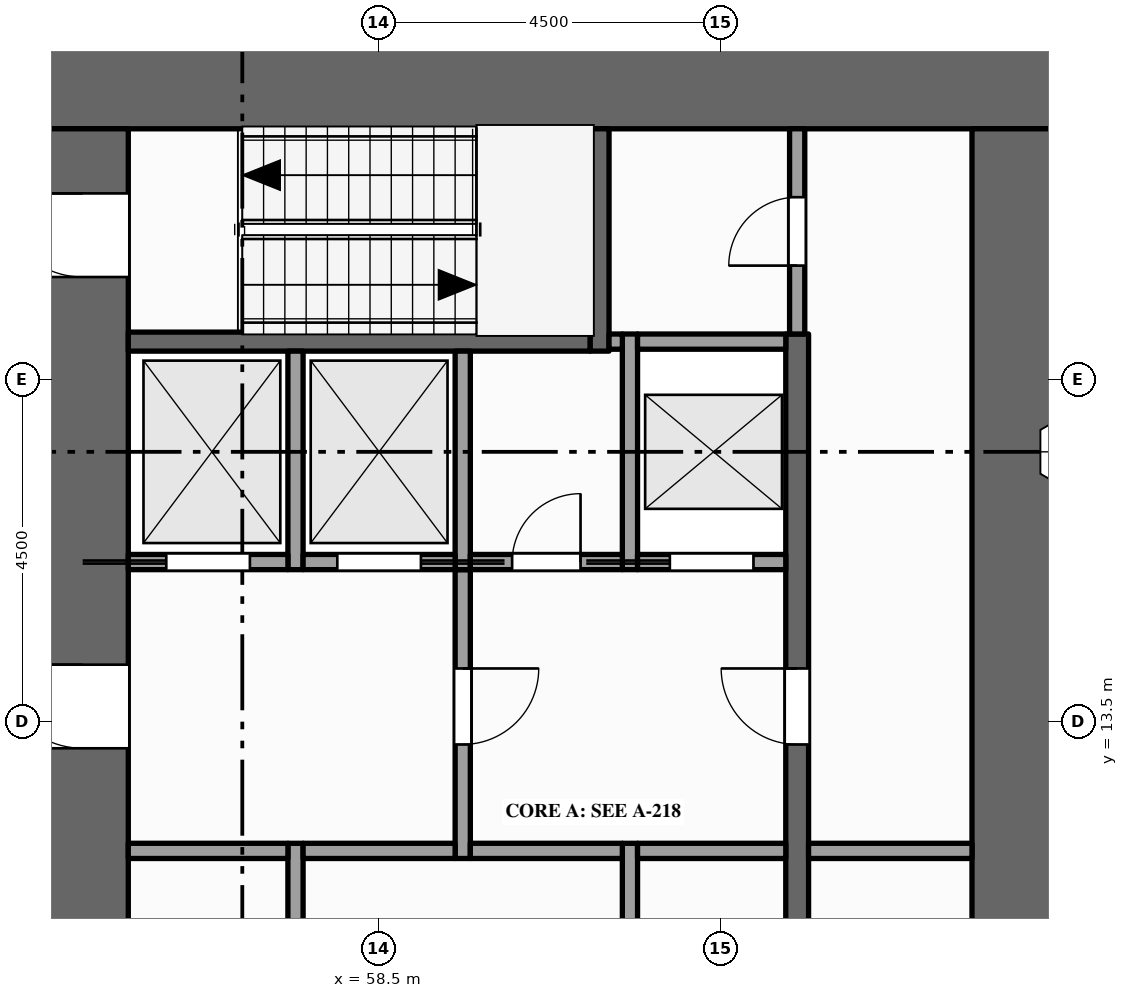
"""IFC4 building model, lengths in metres.
Left out: names, types, materials, properties, quantities, classifications, styles, units other than length and angle.
Written with IfcOpenShell. Run it as: python <this file> out.ifc"""

import sys

from ifc_helpers import new_model, si_unit, direction, frame, frame_2d, origin, place, context, subcontext, project, spatial, rectangle, extrude, element, fill, save


model = new_model("IFC4")
c1 = context("Model", 3, precision=1e-05, world=origin(), true_north=direction((0.0, 1.0)))
c2 = subcontext(c1, "Body", "Model", "MODEL_VIEW")
j1 = project(units=[si_unit("LENGTHUNIT", "METRE"), si_unit("PLANEANGLEUNIT", "RADIAN")], contexts=[c1])
p1 = place(None, origin())
s1 = spatial("IfcSite", under=j1, at=p1, CompositionType="ELEMENT")
p2 = place(p1, origin())
s2 = spatial("IfcBuilding", under=s1, at=p2, CompositionType="ELEMENT")
p3 = place(p2, frame((0.0, 0.0, 103.0)))
s3 = spatial("IfcBuildingStorey", under=s2, at=p3, CompositionType="ELEMENT", Elevation=103.0)
p4 = place(p3, frame((54.0, 21.9, -0.15), z_axis=(0.0, 0.0, 1.0), x_axis=(1.0, 0.0, 0.0)))
e1 = element("IfcWall", 1, at=p4, inside=s3, PredefinedType="SHEAR", context=c2, shape_type="SweptSolid", body=[
    extrude(rectangle(XDim=13.5, YDim=1.2, at=frame_2d((6.75, 0.0))), origin(), (0.0, 0.0, 1.0), 4.0),
])
p5 = place(p3, frame((54.6, 1.2, -0.15), z_axis=(0.0, 0.0, 1.0), x_axis=(0.0, 1.0, 0.0)))
e2 = element("IfcWall", 2, at=p5, inside=s3, PredefinedType="SHEAR", context=c2, shape_type="SweptSolid", body=[
    extrude(rectangle(XDim=20.1, YDim=1.2, at=frame_2d((10.05, 0.0))), origin(), (0.0, 0.0, 1.0), 4.0),
])
p6 = place(p5, frame((5.9, 0.0, 0.15)))
e3 = element("IfcOpeningElement", 3, at=p6, cuts=e2, PredefinedType="OPENING", context=c2, shape_type="SweptSolid", body=[
    extrude(rectangle(XDim=1.8, YDim=2.1, at=frame_2d((0.9, 1.05))), frame((0.0, 0.61, 0.0), z_axis=(0.0, -1.0, 0.0), x_axis=(1.0, 0.0, 0.0)), (0.0, 0.0, 1.0), 1.22),
])
p7 = place(p5, frame((11.95, 0.0, 0.15)))
e4 = element("IfcOpeningElement", 4, at=p7, cuts=e2, PredefinedType="OPENING", context=c2, shape_type="SweptSolid", body=[
    extrude(rectangle(XDim=1.1, YDim=2.1, at=frame_2d((0.55, 1.05))), frame((0.0, 0.61, 0.0), z_axis=(0.0, -1.0, 0.0), x_axis=(1.0, 0.0, 0.0)), (0.0, 0.0, 1.0), 1.22),
])
p8 = place(p5, frame((0.95, 0.0, 0.15)))
e5 = element("IfcOpeningElement", 5, at=p8, cuts=e2, PredefinedType="OPENING", context=c2, shape_type="SweptSolid", body=[
    extrude(rectangle(XDim=1.1, YDim=2.1, at=frame_2d((0.55, 1.05))), frame((0.0, 0.61, 0.0), z_axis=(0.0, -1.0, 0.0), x_axis=(1.0, 0.0, 0.0)), (0.0, 0.0, 1.0), 1.22),
])
p9 = place(p5, frame((18.15, 0.0, 0.15)))
e6 = element("IfcOpeningElement", 6, at=p9, cuts=e2, PredefinedType="OPENING", context=c2, shape_type="SweptSolid", body=[
    extrude(rectangle(XDim=1.1, YDim=2.1, at=frame_2d((0.55, 1.05))), frame((0.0, 0.61, 0.0), z_axis=(0.0, -1.0, 0.0), x_axis=(1.0, 0.0, 0.0)), (0.0, 0.0, 1.0), 1.22),
])
p10 = place(p3, frame((66.9, 1.2, -0.15), z_axis=(0.0, 0.0, 1.0), x_axis=(0.0, 1.0, 0.0)))
e7 = element("IfcWall", 7, at=p10, inside=s3, PredefinedType="SHEAR", context=c2, shape_type="SweptSolid", body=[
    extrude(rectangle(XDim=20.1, YDim=1.2, at=frame_2d((10.05, 0.0))), origin(), (0.0, 0.0, 1.0), 4.0),
])
p11 = place(p3, frame((57.4, 9.3, 0.0), z_axis=(0.0, 0.0, 1.0), x_axis=(0.0, 1.0, 0.0)))
e8 = element("IfcWall", 8, at=p11, inside=s3, PredefinedType="PARTITIONING", context=c2, shape_type="SweptSolid", body=[
    extrude(rectangle(XDim=2.6, YDim=0.2, at=frame_2d((1.3, 0.0))), origin(), (0.0, 0.0, 1.0), 3.85),
])
p12 = place(p3, frame((57.4, 15.5, 0.0), z_axis=(0.0, 0.0, 1.0), x_axis=(0.0, 1.0, 0.0)))
e9 = element("IfcWall", 9, at=p12, inside=s3, PredefinedType="SOLIDWALL", context=c2, shape_type="SweptSolid", body=[
    extrude(rectangle(XDim=2.875, YDim=0.2, at=frame_2d((1.438, 0.0))), origin(), (0.0, 0.0, 1.0), 3.85),
])
p13 = place(p3, frame((59.6, 11.7, 0.0), z_axis=(0.0, 0.0, 1.0), x_axis=(0.0, 1.0, 0.0)))
e10 = element("IfcWall", 10, at=p13, inside=s3, PredefinedType="PARTITIONING", context=c2, shape_type="SweptSolid", body=[
    extrude(rectangle(XDim=3.8, YDim=0.2, at=frame_2d((1.9, 0.0))), origin(), (0.0, 0.0, 1.0), 3.85),
])
p14 = place(p13, frame((1.5, 0.0, 0.0)))
e11 = element("IfcOpeningElement", 11, at=p14, cuts=e10, PredefinedType="OPENING", context=c2, shape_type="SweptSolid", body=[
    extrude(rectangle(XDim=1.0, YDim=2.1, at=frame_2d((0.5, 1.05))), frame((0.0, 0.11, 0.0), z_axis=(0.0, -1.0, 0.0), x_axis=(1.0, 0.0, 0.0)), (0.0, 0.0, 1.0), 0.22),
])
p15 = place(p3, frame((59.6, 15.5, 0.0), z_axis=(0.0, 0.0, 1.0), x_axis=(0.0, 1.0, 0.0)))
e12 = element("IfcWall", 12, at=p15, inside=s3, PredefinedType="SOLIDWALL", context=c2, shape_type="SweptSolid", body=[
    extrude(rectangle(XDim=2.875, YDim=0.2, at=frame_2d((1.438, 0.0))), origin(), (0.0, 0.0, 1.0), 3.85),
])
p16 = place(p3, frame((61.4, 18.375, 0.0), z_axis=(0.0, 0.0, 1.0), x_axis=(0.0, 1.0, 0.0)))
e13 = element("IfcWall", 13, at=p16, inside=s3, PredefinedType="SHEAR", context=c2, shape_type="SweptSolid", body=[
    extrude(rectangle(XDim=2.925, YDim=0.25, at=frame_2d((1.462, 0.0))), origin(), (0.0, 0.0, 1.0), 3.85),
])
p17 = place(p3, frame((61.8, 9.3, 0.0), z_axis=(0.0, 0.0, 1.0), x_axis=(0.0, 1.0, 0.0)))
e14 = element("IfcWall", 14, at=p17, inside=s3, PredefinedType="PARTITIONING", context=c2, shape_type="SweptSolid", body=[
    extrude(rectangle(XDim=2.6, YDim=0.2, at=frame_2d((1.3, 0.0))), origin(), (0.0, 0.0, 1.0), 3.85),
])
p18 = place(p3, frame((61.8, 15.5, 0.0), z_axis=(0.0, 0.0, 1.0), x_axis=(0.0, 1.0, 0.0)))
e15 = element("IfcWall", 15, at=p18, inside=s3, PredefinedType="SOLIDWALL", context=c2, shape_type="SweptSolid", body=[
    extrude(rectangle(XDim=3.1, YDim=0.2, at=frame_2d((1.55, 0.0))), origin(), (0.0, 0.0, 1.0), 3.85),
])
p19 = place(p3, frame((64.0, 4.1, 0.0), z_axis=(0.0, 0.0, 1.0), x_axis=(0.0, 1.0, 0.0)))
e16 = element("IfcWall", 16, at=p19, inside=s3, PredefinedType="SHEAR", context=c2, shape_type="SweptSolid", body=[
    extrude(rectangle(XDim=14.5, YDim=0.3, at=frame_2d((7.25, 0.0))), origin(), (0.0, 0.0, 1.0), 3.85),
])
p20 = place(p19, frame((3.4, 0.0, 0.0)))
e17 = element("IfcOpeningElement", 17, at=p20, cuts=e16, PredefinedType="OPENING", context=c2, shape_type="SweptSolid", body=[
    extrude(rectangle(XDim=1.0, YDim=2.1, at=frame_2d((0.5, 1.05))), frame((0.0, 0.16, 0.0), z_axis=(0.0, -1.0, 0.0), x_axis=(1.0, 0.0, 0.0)), (0.0, 0.0, 1.0), 0.32),
])
p21 = place(p19, frame((9.1, 0.0, 0.0)))
e18 = element("IfcOpeningElement", 18, at=p21, cuts=e16, PredefinedType="OPENING", context=c2, shape_type="SweptSolid", body=[
    extrude(rectangle(XDim=1.0, YDim=2.1, at=frame_2d((0.5, 1.05))), frame((0.0, 0.16, 0.0), z_axis=(0.0, -1.0, 0.0), x_axis=(1.0, 0.0, 0.0)), (0.0, 0.0, 1.0), 0.32),
])
p22 = place(p3, frame((64.0, 18.6, 0.0), z_axis=(0.0, 0.0, 1.0), x_axis=(0.0, 1.0, 0.0)))
e19 = element("IfcWall", 19, at=p22, inside=s3, PredefinedType="PARTITIONING", context=c2, shape_type="SweptSolid", body=[
    extrude(rectangle(XDim=2.7, YDim=0.2, at=frame_2d((1.35, 0.0))), origin(), (0.0, 0.0, 1.0), 3.85),
])
p23 = place(p22, frame((0.9, 0.0, 0.0)))
e20 = element("IfcOpeningElement", 20, at=p23, cuts=e19, PredefinedType="OPENING", context=c2, shape_type="SweptSolid", body=[
    extrude(rectangle(XDim=0.9, YDim=2.1, at=frame_2d((0.45, 1.05))), frame((0.0, 0.11, 0.0), z_axis=(0.0, -1.0, 0.0), x_axis=(1.0, 0.0, 0.0)), (0.0, 0.0, 1.0), 0.22),
])
p24 = place(p3, frame((55.2, 11.8, 0.0), z_axis=(0.0, 0.0, 1.0), x_axis=(1.0, 0.0, 0.0)))
e21 = element("IfcWall", 21, at=p24, inside=s3, PredefinedType="PARTITIONING", context=c2, shape_type="SweptSolid", body=[
    extrude(rectangle(XDim=2.1, YDim=0.2, at=frame_2d((1.05, 0.0))), origin(), (0.0, 0.0, 1.0), 3.85),
])
for number, where, z_axis, x_axis in (
    (22, (57.5, 11.8, 0.0), (0.0, 0.0, 1.0), (1.0, 0.0, 0.0)),
    (23, (59.7, 11.8, 0.0), (0.0, 0.0, 1.0), (1.0, 0.0, 0.0)),
):
    element("IfcWall", number, at=place(p3, frame(where, z_axis=z_axis, x_axis=x_axis)), inside=s3, PredefinedType="PARTITIONING", context=c2, shape_type="SweptSolid", body=[
        extrude(rectangle(XDim=2.0, YDim=0.2, at=frame_2d((1.0, 0.0))), origin(), (0.0, 0.0, 1.0), 3.85),
    ])
p25 = place(p3, frame((61.9, 11.8, 0.0), z_axis=(0.0, 0.0, 1.0), x_axis=(1.0, 0.0, 0.0)))
e24 = element("IfcWall", 24, at=p25, inside=s3, PredefinedType="PARTITIONING", context=c2, shape_type="SweptSolid", body=[
    extrude(rectangle(XDim=1.95, YDim=0.2, at=frame_2d((0.975, 0.0))), origin(), (0.0, 0.0, 1.0), 3.85),
])
p26 = place(p3, frame((64.15, 11.8, 0.0), z_axis=(0.0, 0.0, 1.0), x_axis=(1.0, 0.0, 0.0)))
e25 = element("IfcWall", 25, at=p26, inside=s3, PredefinedType="PARTITIONING", context=c2, shape_type="SweptSolid", body=[
    extrude(rectangle(XDim=2.15, YDim=0.2, at=frame_2d((1.075, 0.0))), origin(), (0.0, 0.0, 1.0), 3.85),
])
p27 = place(p3, frame((55.2, 15.6, 0.0), z_axis=(0.0, 0.0, 1.0), x_axis=(1.0, 0.0, 0.0)))
e26 = element("IfcWall", 26, at=p27, inside=s3, PredefinedType="SOLIDWALL", context=c2, shape_type="SweptSolid", body=[
    extrude(rectangle(XDim=2.1, YDim=0.2, at=frame_2d((1.05, 0.0))), origin(), (0.0, 0.0, 1.0), 3.85),
])
p28 = place(p27, frame((0.5, 0.0, 0.012)))
e27 = element("IfcOpeningElement", 27, at=p28, cuts=e26, PredefinedType="OPENING", context=c2, shape_type="SweptSolid", body=[
    extrude(rectangle(XDim=1.1, YDim=2.1, at=frame_2d((0.55, 1.05))), frame((0.0, 0.11, 0.0), z_axis=(0.0, -1.0, 0.0), x_axis=(1.0, 0.0, 0.0)), (0.0, 0.0, 1.0), 0.22),
])
p29 = place(p3, frame((57.5, 15.6, 0.0), z_axis=(0.0, 0.0, 1.0), x_axis=(1.0, 0.0, 0.0)))
e28 = element("IfcWall", 28, at=p29, inside=s3, PredefinedType="SOLIDWALL", context=c2, shape_type="SweptSolid", body=[
    extrude(rectangle(XDim=2.0, YDim=0.2, at=frame_2d((1.0, 0.0))), origin(), (0.0, 0.0, 1.0), 3.85),
])
p30 = place(p29, frame((0.45, 0.0, 0.012)))
e29 = element("IfcOpeningElement", 29, at=p30, cuts=e28, PredefinedType="OPENING", context=c2, shape_type="SweptSolid", body=[
    extrude(rectangle(XDim=1.1, YDim=2.1, at=frame_2d((0.55, 1.05))), frame((0.0, 0.11, 0.0), z_axis=(0.0, -1.0, 0.0), x_axis=(1.0, 0.0, 0.0)), (0.0, 0.0, 1.0), 0.22),
])
p31 = place(p3, frame((59.7, 15.6, 0.0), z_axis=(0.0, 0.0, 1.0), x_axis=(1.0, 0.0, 0.0)))
e30 = element("IfcWall", 30, at=p31, inside=s3, PredefinedType="PARTITIONING", context=c2, shape_type="SweptSolid", body=[
    extrude(rectangle(XDim=2.0, YDim=0.2, at=frame_2d((1.0, 0.0))), origin(), (0.0, 0.0, 1.0), 3.85),
])
p32 = place(p31, frame((0.55, 0.0, 0.0)))
e31 = element("IfcOpeningElement", 31, at=p32, cuts=e30, PredefinedType="OPENING", context=c2, shape_type="SweptSolid", body=[
    extrude(rectangle(XDim=0.9, YDim=2.1, at=frame_2d((0.45, 1.05))), frame((0.0, 0.11, 0.0), z_axis=(0.0, -1.0, 0.0), x_axis=(1.0, 0.0, 0.0)), (0.0, 0.0, 1.0), 0.22),
])
p33 = place(p3, frame((61.9, 15.6, 0.0), z_axis=(0.0, 0.0, 1.0), x_axis=(1.0, 0.0, 0.0)))
e32 = element("IfcWall", 32, at=p33, inside=s3, PredefinedType="SOLIDWALL", context=c2, shape_type="SweptSolid", body=[
    extrude(rectangle(XDim=1.95, YDim=0.2, at=frame_2d((0.975, 0.0))), origin(), (0.0, 0.0, 1.0), 3.85),
])
p34 = place(p33, frame((0.425, 0.0, 0.012)))
e33 = element("IfcOpeningElement", 33, at=p34, cuts=e32, PredefinedType="OPENING", context=c2, shape_type="SweptSolid", body=[
    extrude(rectangle(XDim=1.1, YDim=2.1, at=frame_2d((0.55, 1.05))), frame((0.0, 0.11, 0.0), z_axis=(0.0, -1.0, 0.0), x_axis=(1.0, 0.0, 0.0)), (0.0, 0.0, 1.0), 0.22),
])
p35 = place(p3, frame((55.2, 18.5, 0.0), z_axis=(0.0, 0.0, 1.0), x_axis=(1.0, 0.0, 0.0)))
e34 = element("IfcWall", 34, at=p35, inside=s3, PredefinedType="SHEAR", context=c2, shape_type="SweptSolid", body=[
    extrude(rectangle(XDim=6.075, YDim=0.25, at=frame_2d((3.038, 0.0))), origin(), (0.0, 0.0, 1.0), 3.85),
])
p36 = place(p3, frame((61.525, 18.5, 0.0), z_axis=(0.0, 0.0, 1.0), x_axis=(1.0, 0.0, 0.0)))
e35 = element("IfcWall", 35, at=p36, inside=s3, PredefinedType="PARTITIONING", context=c2, shape_type="SweptSolid", body=[
    extrude(rectangle(XDim=0.175, YDim=0.2, at=frame_2d((0.087, 0.0))), origin(), (0.0, 0.0, 1.0), 3.85),
])
p37 = place(p3, frame((61.9, 18.5, 0.0), z_axis=(0.0, 0.0, 1.0), x_axis=(1.0, 0.0, 0.0)))
e36 = element("IfcWall", 36, at=p37, inside=s3, PredefinedType="SOLIDWALL", context=c2, shape_type="SweptSolid", body=[
    extrude(rectangle(XDim=1.95, YDim=0.2, at=frame_2d((0.975, 0.0))), origin(), (0.0, 0.0, 1.0), 3.85),
])
p38 = place(p28, origin())
e37 = element("IfcDoor", 37, at=p38, inside=s3, OperationType="SLIDING_TO_LEFT", PredefinedType="DOOR", context=c2, shape_type="SweptSolid", body=[
    extrude(rectangle(XDim=1.1, YDim=2.1, at=frame_2d((0.55, 1.05))), frame((0.0, 0.025, 0.0), z_axis=(0.0, -1.0, 0.0), x_axis=(1.0, 0.0, 0.0)), (0.0, 0.0, 1.0), 0.05),
])
fill(e27, e37)
p39 = place(p30, origin())
e38 = element("IfcDoor", 38, at=p39, inside=s3, OperationType="SLIDING_TO_RIGHT", PredefinedType="DOOR", context=c2, shape_type="SweptSolid", body=[
    extrude(rectangle(XDim=1.1, YDim=2.1, at=frame_2d((0.55, 1.05))), frame((0.0, 0.025, 0.0), z_axis=(0.0, -1.0, 0.0), x_axis=(1.0, 0.0, 0.0)), (0.0, 0.0, 1.0), 0.05),
])
fill(e29, e38)
p40 = place(p34, origin())
e39 = element("IfcDoor", 39, at=p40, inside=s3, OperationType="SLIDING_TO_LEFT", PredefinedType="DOOR", context=c2, shape_type="SweptSolid", body=[
    extrude(rectangle(XDim=1.1, YDim=2.1, at=frame_2d((0.55, 1.05))), frame((0.0, 0.025, 0.0), z_axis=(0.0, -1.0, 0.0), x_axis=(1.0, 0.0, 0.0)), (0.0, 0.0, 1.0), 0.05),
])
fill(e33, e39)
p41 = place(p7, origin())
e40 = element("IfcDoor", 40, at=p41, inside=s3, OperationType="SINGLE_SWING_RIGHT", PredefinedType="DOOR", context=c2, shape_type="SweptSolid", body=[
    extrude(rectangle(XDim=1.1, YDim=2.1, at=frame_2d((0.55, 1.05))), frame((0.0, 0.025, 0.0), z_axis=(0.0, -1.0, 0.0), x_axis=(1.0, 0.0, 0.0)), (0.0, 0.0, 1.0), 0.05),
])
fill(e4, e40)
p42 = place(p14, origin())
e41 = element("IfcDoor", 41, at=p42, inside=s3, OperationType="SINGLE_SWING_RIGHT", PredefinedType="DOOR", context=c2, shape_type="SweptSolid", body=[
    extrude(rectangle(XDim=1.0, YDim=2.1, at=frame_2d((0.5, 1.05))), frame((0.0, 0.025, 0.0), z_axis=(0.0, -1.0, 0.0), x_axis=(1.0, 0.0, 0.0)), (0.0, 0.0, 1.0), 0.05),
])
fill(e11, e41)
p43 = place(p21, origin())
e42 = element("IfcDoor", 42, at=p43, inside=s3, OperationType="SINGLE_SWING_RIGHT", PredefinedType="DOOR", context=c2, shape_type="SweptSolid", body=[
    extrude(rectangle(XDim=1.0, YDim=2.1, at=frame_2d((0.5, 1.05))), frame((0.0, 0.025, 0.0), z_axis=(0.0, -1.0, 0.0), x_axis=(1.0, 0.0, 0.0)), (0.0, 0.0, 1.0), 0.05),
])
fill(e18, e42)
p44 = place(p9, origin())
e43 = element("IfcDoor", 43, at=p44, inside=s3, OperationType="SINGLE_SWING_RIGHT", PredefinedType="DOOR", context=c2, shape_type="SweptSolid", body=[
    extrude(rectangle(XDim=1.1, YDim=2.1, at=frame_2d((0.55, 1.05))), frame((0.0, 0.025, 0.0), z_axis=(0.0, -1.0, 0.0), x_axis=(1.0, 0.0, 0.0)), (0.0, 0.0, 1.0), 0.05),
])
fill(e6, e43)
p45 = place(p23, origin())
e44 = element("IfcDoor", 44, at=p45, inside=s3, OperationType="SINGLE_SWING_LEFT", PredefinedType="DOOR", context=c2, shape_type="SweptSolid", body=[
    extrude(rectangle(XDim=0.9, YDim=2.1, at=frame_2d((0.45, 1.05))), frame((0.0, 0.025, 0.0), z_axis=(0.0, -1.0, 0.0), x_axis=(1.0, 0.0, 0.0)), (0.0, 0.0, 1.0), 0.05),
])
fill(e20, e44)
p46 = place(p32, origin())
e45 = element("IfcDoor", 45, at=p46, inside=s3, OperationType="SINGLE_SWING_RIGHT", PredefinedType="DOOR", context=c2, shape_type="SweptSolid", body=[
    extrude(rectangle(XDim=0.9, YDim=2.1, at=frame_2d((0.45, 1.05))), frame((0.0, 0.025, 0.0), z_axis=(0.0, -1.0, 0.0), x_axis=(1.0, 0.0, 0.0)), (0.0, 0.0, 1.0), 0.05),
])
fill(e31, e45)
save(model, sys.argv[1])
